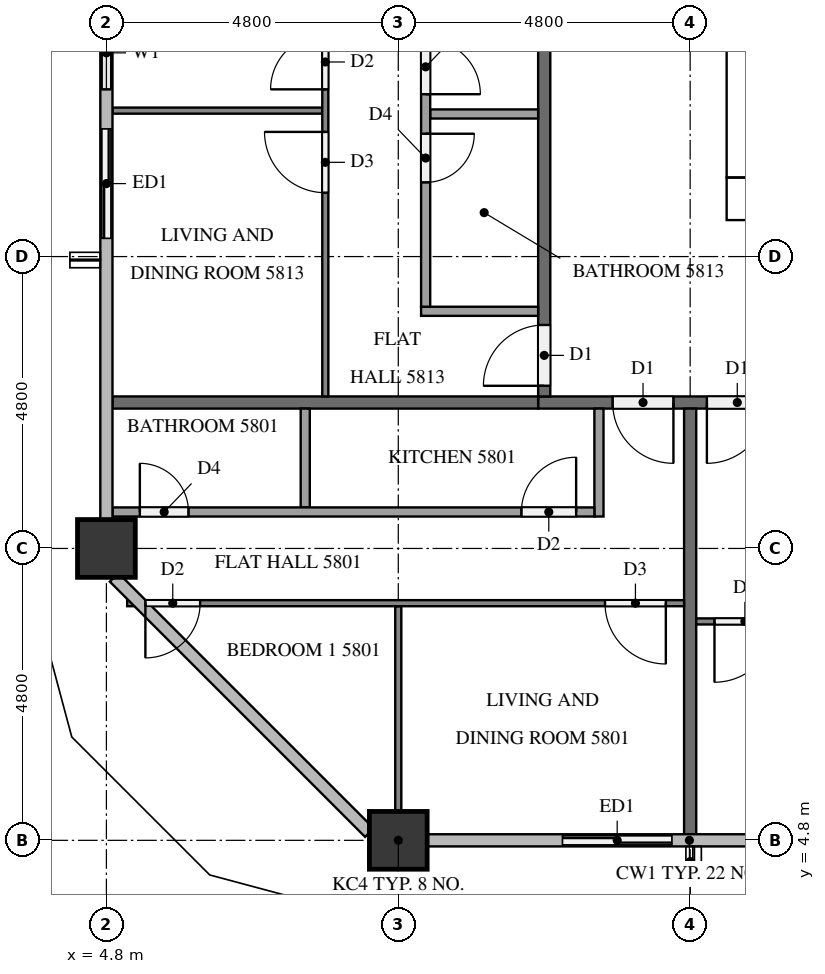
"""IFC4 building model, lengths in metres.
Left out: names, types, materials, properties, quantities, classifications, styles, units other than length and angle.
Written with IfcOpenShell. Run it as: python <this file> out.ifc"""

import sys

from ifc_helpers import new_model, si_unit, direction, frame, frame_2d, origin, origin_2d, place, context, subcontext, project, spatial, rectangle, extrude, element, fill, save


model = new_model("IFC4")
c1 = context("Model", 3, precision=1e-05, world=origin(), true_north=direction((0.0, 1.0)))
c2 = subcontext(c1, "Body", "Model", "MODEL_VIEW")
j1 = project(units=[si_unit("LENGTHUNIT", "METRE"), si_unit("PLANEANGLEUNIT", "RADIAN")], contexts=[c1])
p1 = place(None, origin())
s1 = spatial("IfcSite", under=j1, at=p1, CompositionType="ELEMENT")
p2 = place(p1, origin())
s2 = spatial("IfcBuilding", under=s1, at=p2, CompositionType="ELEMENT")
p3 = place(p2, frame((0.0, 0.0, 222.8)))
s3 = spatial("IfcBuildingStorey", under=s2, at=p3, CompositionType="ELEMENT", Elevation=222.8)
p4 = place(p3, frame((15.0, 15.35, 0.0), z_axis=(0.0, 0.0, 1.0), x_axis=(1.0, 0.0, 0.0)))
e1 = element("IfcWall", 1, at=p4, inside=s3, PredefinedType="SHEAR", context=c2, shape_type="SweptSolid", body=[
    extrude(rectangle(XDim=32.4, YDim=0.7, at=frame_2d((16.2, 0.0))), origin(), (0.0, 0.0, 1.0), 3.2),
])
p5 = place(p4, frame((15.3, 0.0, 0.0)))
e2 = element("IfcOpeningElement", 2, at=p5, cuts=e1, PredefinedType="OPENING", context=c2, shape_type="SweptSolid", body=[
    extrude(rectangle(XDim=1.8, YDim=2.1, at=frame_2d((0.9, 1.05))), frame((0.0, 0.36, 0.0), z_axis=(0.0, -1.0, 0.0), x_axis=(1.0, 0.0, 0.0)), (0.0, 0.0, 1.0), 0.72),
])
p6 = place(p3, frame((15.35, 15.7, 0.0), z_axis=(0.0, 0.0, 1.0), x_axis=(0.0, 1.0, 0.0)))
e3 = element("IfcWall", 3, at=p6, inside=s3, PredefinedType="SHEAR", context=c2, shape_type="SweptSolid", body=[
    extrude(rectangle(XDim=21.4, YDim=0.7, at=frame_2d((10.7, 0.0))), origin(), (0.0, 0.0, 1.0), 3.2),
])
p7 = place(p6, frame((5.06, 0.0, 0.0)))
e4 = element("IfcOpeningElement", 4, at=p7, cuts=e3, PredefinedType="OPENING", context=c2, shape_type="SweptSolid", body=[
    extrude(rectangle(XDim=1.2, YDim=2.1, at=frame_2d((0.6, 1.05))), frame((0.0, 0.36, 0.0), z_axis=(0.0, -1.0, 0.0), x_axis=(1.0, 0.0, 0.0)), (0.0, 0.0, 1.0), 0.72),
])
for number, where, z_axis, x_axis in (
    (5, (9.6, 4.8, 0.0), (0.0, 0.0, 1.0), (1.0, 0.0, 0.0)),
    (6, (4.8, 9.6, 0.0), (0.0, 0.0, 1.0), (1.0, 0.0, 0.0)),
):
    element("IfcColumn", number, at=place(p3, frame(where, z_axis=z_axis, x_axis=x_axis)), inside=s3, PredefinedType="COLUMN", context=c2, shape_type="SweptSolid", body=[
        extrude(rectangle(XDim=0.95, YDim=0.95, at=origin_2d()), origin(), (0.0, 0.0, 1.0), 3.2),
    ])
p8 = place(p3, frame((12.0, 4.8, 0.0), z_axis=(0.0, 0.0, 1.0), x_axis=(1.0, 0.0, 0.0)))
e7 = element("IfcWall", 7, at=p8, inside=s3, PredefinedType="SOLIDWALL", context=c2, shape_type="SweptSolid", body=[
    extrude(rectangle(XDim=2.4, YDim=0.15, at=frame_2d((1.2, 0.0))), origin(), (0.0, 0.0, 1.0), 3.2),
])
p9 = place(p8, frame((0.3, 0.0, 0.0)))
e8 = element("IfcOpeningElement", 8, at=p9, cuts=e7, PredefinedType="OPENING", context=c2, shape_type="SweptSolid", body=[
    extrude(rectangle(XDim=1.8, YDim=2.4, at=frame_2d((0.9, 1.2))), frame((0.0, 0.085, 0.0), z_axis=(0.0, -1.0, 0.0), x_axis=(1.0, 0.0, 0.0)), (0.0, 0.0, 1.0), 0.17),
])
p10 = place(p3, frame((4.8, 18.7, 0.0), z_axis=(0.0, 0.0, 1.0), x_axis=(0.0, -1.0, 0.0)))
e9 = element("IfcWall", 9, at=p10, inside=s3, PredefinedType="SOLIDWALL", context=c2, shape_type="SweptSolid", body=[
    extrude(rectangle(XDim=4.3, YDim=0.15, at=frame_2d((2.15, 0.0))), origin(), (0.0, 0.0, 1.0), 3.2),
])
p11 = place(p10, frame((0.35, 0.0, 0.9)))
e10 = element("IfcOpeningElement", 10, at=p11, cuts=e9, PredefinedType="OPENING", context=c2, shape_type="SweptSolid", body=[
    extrude(rectangle(XDim=1.2, YDim=1.4, at=frame_2d((0.6, 0.7))), frame((0.0, 0.085, 0.0), z_axis=(0.0, -1.0, 0.0), x_axis=(1.0, 0.0, 0.0)), (0.0, 0.0, 1.0), 0.17),
])
p12 = place(p10, frame((2.2, 0.0, 0.0)))
e11 = element("IfcOpeningElement", 11, at=p12, cuts=e9, PredefinedType="OPENING", context=c2, shape_type="SweptSolid", body=[
    extrude(rectangle(XDim=1.8, YDim=2.4, at=frame_2d((0.9, 1.2))), frame((0.0, 0.085, 0.0), z_axis=(0.0, -1.0, 0.0), x_axis=(1.0, 0.0, 0.0)), (0.0, 0.0, 1.0), 0.17),
])
p13 = place(p3, frame((50.5, 12.0, 0.0), z_axis=(0.0, 0.0, 1.0), x_axis=(-1.0, 0.0, 0.0)))
e12 = element("IfcWall", 12, at=p13, inside=s3, PredefinedType="PARTITIONING", context=c2, shape_type="SweptSolid", body=[
    extrude(rectangle(XDim=38.6, YDim=0.2, at=frame_2d((19.3, 0.0))), origin(), (0.0, 0.0, 1.0), 3.2),
])
p14 = place(p13, frame((36.375, 0.0, 0.0)))
e13 = element("IfcOpeningElement", 13, at=p14, cuts=e12, PredefinedType="OPENING", context=c2, shape_type="SweptSolid", body=[
    extrude(rectangle(XDim=1.0, YDim=2.1, at=frame_2d((0.5, 1.05))), frame((0.0, 0.11, 0.0), z_axis=(0.0, -1.0, 0.0), x_axis=(1.0, 0.0, 0.0)), (0.0, 0.0, 1.0), 0.22),
])
p15 = place(p13, frame((34.825, 0.0, 0.0)))
e14 = element("IfcOpeningElement", 14, at=p15, cuts=e12, PredefinedType="OPENING", context=c2, shape_type="SweptSolid", body=[
    extrude(rectangle(XDim=1.0, YDim=2.1, at=frame_2d((0.5, 1.05))), frame((0.0, 0.11, 0.0), z_axis=(0.0, -1.0, 0.0), x_axis=(1.0, 0.0, 0.0)), (0.0, 0.0, 1.0), 0.22),
])
p16 = place(p13, frame((20.375, 0.0, 0.0)))
e15 = element("IfcOpeningElement", 15, at=p16, cuts=e12, PredefinedType="OPENING", context=c2, shape_type="SweptSolid", body=[
    extrude(rectangle(XDim=1.1, YDim=2.1, at=frame_2d((0.55, 1.05))), frame((0.0, 0.11, 0.0), z_axis=(0.0, -1.0, 0.0), x_axis=(1.0, 0.0, 0.0)), (0.0, 0.0, 1.0), 0.22),
])
p17 = place(p13, frame((1.225, 0.0, 0.0)))
e16 = element("IfcOpeningElement", 16, at=p17, cuts=e12, PredefinedType="OPENING", context=c2, shape_type="SweptSolid", body=[
    extrude(rectangle(XDim=1.0, YDim=2.1, at=frame_2d((0.5, 1.05))), frame((0.0, 0.11, 0.0), z_axis=(0.0, -1.0, 0.0), x_axis=(1.0, 0.0, 0.0)), (0.0, 0.0, 1.0), 0.22),
])
p18 = place(p3, frame((12.0, 12.1, 0.0), z_axis=(0.0, 0.0, 1.0), x_axis=(0.0, 1.0, 0.0)))
e17 = element("IfcWall", 17, at=p18, inside=s3, PredefinedType="PARTITIONING", context=c2, shape_type="SweptSolid", body=[
    extrude(rectangle(XDim=28.6, YDim=0.2, at=frame_2d((14.3, 0.0))), origin(), (0.0, 0.0, 1.0), 3.2),
])
p19 = place(p18, frame((9.725, 0.0, 0.0)))
e18 = element("IfcOpeningElement", 18, at=p19, cuts=e17, PredefinedType="OPENING", context=c2, shape_type="SweptSolid", body=[
    extrude(rectangle(XDim=1.1, YDim=2.1, at=frame_2d((0.55, 1.05))), frame((0.0, 0.11, 0.0), z_axis=(0.0, -1.0, 0.0), x_axis=(1.0, 0.0, 0.0)), (0.0, 0.0, 1.0), 0.22),
])
p20 = place(p18, frame((0.175, 0.0, 0.0)))
e19 = element("IfcOpeningElement", 19, at=p20, cuts=e17, PredefinedType="OPENING", context=c2, shape_type="SweptSolid", body=[
    extrude(rectangle(XDim=1.0, YDim=2.1, at=frame_2d((0.5, 1.05))), frame((0.0, 0.11, 0.0), z_axis=(0.0, -1.0, 0.0), x_axis=(1.0, 0.0, 0.0)), (0.0, 0.0, 1.0), 0.22),
])
for number, where, z_axis, x_axis in (
    (20, (14.4, 11.9, 0.0), (0.0, 0.0, 1.0), (0.0, -1.0, 0.0)),
    (21, (4.9, 12.0, 0.0), (0.0, 0.0, 1.0), (1.0, 0.0, 0.0)),
):
    element("IfcWall", number, at=place(p3, frame(where, z_axis=z_axis, x_axis=x_axis)), inside=s3, PredefinedType="PARTITIONING", context=c2, shape_type="SweptSolid", body=[
        extrude(rectangle(XDim=7.0, YDim=0.2, at=frame_2d((3.5, 0.0))), origin(), (0.0, 0.0, 1.0), 3.2),
    ])
p21 = place(p3, frame((9.6, 8.65, 0.0), z_axis=(0.0, 0.0, 1.0), x_axis=(0.0, -1.0, 0.0)))
e22 = element("IfcWall", 22, at=p21, inside=s3, PredefinedType="PARTITIONING", context=c2, shape_type="SweptSolid", body=[
    extrude(rectangle(XDim=3.375, YDim=0.1, at=frame_2d((1.688, 0.0))), origin(), (0.0, 0.0, 1.0), 3.2),
])
p22 = place(p3, frame((14.3, 8.7, 0.0), z_axis=(0.0, 0.0, 1.0), x_axis=(-1.0, 0.0, 0.0)))
e23 = element("IfcWall", 23, at=p22, inside=s3, PredefinedType="PARTITIONING", context=c2, shape_type="SweptSolid", body=[
    extrude(rectangle(XDim=9.159, YDim=0.1, at=frame_2d((4.58, 0.0))), origin(), (0.0, 0.0, 1.0), 3.2),
])
p23 = place(p22, frame((0.3, 0.0, 0.0)))
e24 = element("IfcOpeningElement", 24, at=p23, cuts=e23, PredefinedType="OPENING", context=c2, shape_type="SweptSolid", body=[
    extrude(rectangle(XDim=1.0, YDim=2.1, at=frame_2d((0.5, 1.05))), frame((0.0, 0.06, 0.0), z_axis=(0.0, -1.0, 0.0), x_axis=(1.0, 0.0, 0.0)), (0.0, 0.0, 1.0), 0.12),
])
p24 = place(p22, frame((7.959, 0.0, 0.0)))
e25 = element("IfcOpeningElement", 25, at=p24, cuts=e23, PredefinedType="OPENING", context=c2, shape_type="SweptSolid", body=[
    extrude(rectangle(XDim=0.9, YDim=2.1, at=frame_2d((0.45, 1.05))), frame((0.0, 0.06, 0.0), z_axis=(0.0, -1.0, 0.0), x_axis=(1.0, 0.0, 0.0)), (0.0, 0.0, 1.0), 0.12),
])
p25 = place(p3, frame((8.07, 11.9, 0.0), z_axis=(0.0, 0.0, 1.0), x_axis=(0.0, -1.0, 0.0)))
e26 = element("IfcWall", 26, at=p25, inside=s3, PredefinedType="PARTITIONING", context=c2, shape_type="SweptSolid", body=[
    extrude(rectangle(XDim=1.625, YDim=0.15, at=frame_2d((0.812, 0.0))), origin(), (0.0, 0.0, 1.0), 3.2),
])
p26 = place(p3, frame((12.9, 11.9, 0.0), z_axis=(0.0, 0.0, 1.0), x_axis=(0.0, -1.0, 0.0)))
e27 = element("IfcWall", 27, at=p26, inside=s3, PredefinedType="PARTITIONING", context=c2, shape_type="SweptSolid", body=[
    extrude(rectangle(XDim=1.775, YDim=0.15, at=frame_2d((0.887, 0.0))), origin(), (0.0, 0.0, 1.0), 3.2),
])
p27 = place(p3, frame((4.9, 10.2, 0.0), z_axis=(0.0, 0.0, 1.0), x_axis=(1.0, 0.0, 0.0)))
e28 = element("IfcWall", 28, at=p27, inside=s3, PredefinedType="PARTITIONING", context=c2, shape_type="SweptSolid", body=[
    extrude(rectangle(XDim=7.925, YDim=0.15, at=frame_2d((3.962, 0.0))), origin(), (0.0, 0.0, 1.0), 3.2),
])
p28 = place(p27, frame((6.725, 0.0, 0.0)))
e29 = element("IfcOpeningElement", 29, at=p28, cuts=e28, PredefinedType="OPENING", context=c2, shape_type="SweptSolid", body=[
    extrude(rectangle(XDim=0.9, YDim=2.1, at=frame_2d((0.45, 1.05))), frame((0.0, 0.085, 0.0), z_axis=(0.0, -1.0, 0.0), x_axis=(1.0, 0.0, 0.0)), (0.0, 0.0, 1.0), 0.17),
])
p29 = place(p27, frame((0.45, 0.0, 0.0)))
e30 = element("IfcOpeningElement", 30, at=p29, cuts=e28, PredefinedType="OPENING", context=c2, shape_type="SweptSolid", body=[
    extrude(rectangle(XDim=0.8, YDim=2.1, at=frame_2d((0.4, 1.05))), frame((0.0, 0.085, 0.0), z_axis=(0.0, -1.0, 0.0), x_axis=(1.0, 0.0, 0.0)), (0.0, 0.0, 1.0), 0.17),
])
p30 = place(p3, frame((28.7, 8.4, 0.0), z_axis=(0.0, 0.0, 1.0), x_axis=(-1.0, 0.0, 0.0)))
e31 = element("IfcWall", 31, at=p30, inside=s3, PredefinedType="PARTITIONING", context=c2, shape_type="SweptSolid", body=[
    extrude(rectangle(XDim=14.2, YDim=0.1, at=frame_2d((7.1, 0.0))), origin(), (0.0, 0.0, 1.0), 3.2),
])
p31 = place(p30, frame((12.9, 0.0, 0.0)))
e32 = element("IfcOpeningElement", 32, at=p31, cuts=e31, PredefinedType="OPENING", context=c2, shape_type="SweptSolid", body=[
    extrude(rectangle(XDim=1.0, YDim=2.1, at=frame_2d((0.5, 1.05))), frame((0.0, 0.06, 0.0), z_axis=(0.0, -1.0, 0.0), x_axis=(1.0, 0.0, 0.0)), (0.0, 0.0, 1.0), 0.12),
])
p32 = place(p30, frame((5.05, 0.0, 0.0)))
e33 = element("IfcOpeningElement", 33, at=p32, cuts=e31, PredefinedType="OPENING", context=c2, shape_type="SweptSolid", body=[
    extrude(rectangle(XDim=0.9, YDim=2.1, at=frame_2d((0.45, 1.05))), frame((0.0, 0.06, 0.0), z_axis=(0.0, -1.0, 0.0), x_axis=(1.0, 0.0, 0.0)), (0.0, 0.0, 1.0), 0.12),
])
p33 = place(p30, frame((3.45, 0.0, 0.0)))
e34 = element("IfcOpeningElement", 34, at=p33, cuts=e31, PredefinedType="OPENING", context=c2, shape_type="SweptSolid", body=[
    extrude(rectangle(XDim=0.9, YDim=2.1, at=frame_2d((0.45, 1.05))), frame((0.0, 0.06, 0.0), z_axis=(0.0, -1.0, 0.0), x_axis=(1.0, 0.0, 0.0)), (0.0, 0.0, 1.0), 0.12),
])
p34 = place(p3, frame((8.35, 16.8, 0.0), z_axis=(0.0, 0.0, 1.0), x_axis=(-1.0, 0.0, 0.0)))
e35 = element("IfcWall", 35, at=p34, inside=s3, PredefinedType="PARTITIONING", context=c2, shape_type="SweptSolid", body=[
    extrude(rectangle(XDim=3.45, YDim=0.1, at=frame_2d((1.725, 0.0))), origin(), (0.0, 0.0, 1.0), 3.2),
])
p35 = place(p3, frame((8.4, 12.1, 0.0), z_axis=(0.0, 0.0, 1.0), x_axis=(0.0, 1.0, 0.0)))
e36 = element("IfcWall", 36, at=p35, inside=s3, PredefinedType="PARTITIONING", context=c2, shape_type="SweptSolid", body=[
    extrude(rectangle(XDim=9.4, YDim=0.1, at=frame_2d((4.7, 0.0))), origin(), (0.0, 0.0, 1.0), 3.2),
])
p36 = place(p35, frame((3.35, 0.0, 0.0)))
e37 = element("IfcOpeningElement", 37, at=p36, cuts=e36, PredefinedType="OPENING", context=c2, shape_type="SweptSolid", body=[
    extrude(rectangle(XDim=1.0, YDim=2.1, at=frame_2d((0.5, 1.05))), frame((0.0, 0.06, 0.0), z_axis=(0.0, -1.0, 0.0), x_axis=(1.0, 0.0, 0.0)), (0.0, 0.0, 1.0), 0.12),
])
p37 = place(p35, frame((5.05, 0.0, 0.0)))
e38 = element("IfcOpeningElement", 38, at=p37, cuts=e36, PredefinedType="OPENING", context=c2, shape_type="SweptSolid", body=[
    extrude(rectangle(XDim=0.9, YDim=2.1, at=frame_2d((0.45, 1.05))), frame((0.0, 0.06, 0.0), z_axis=(0.0, -1.0, 0.0), x_axis=(1.0, 0.0, 0.0)), (0.0, 0.0, 1.0), 0.12),
])
p38 = place(p3, frame((11.9, 16.745, 0.0), z_axis=(0.0, 0.0, 1.0), x_axis=(-1.0, 0.0, 0.0)))
e39 = element("IfcWall", 39, at=p38, inside=s3, PredefinedType="PARTITIONING", context=c2, shape_type="SweptSolid", body=[
    extrude(rectangle(XDim=1.775, YDim=0.15, at=frame_2d((0.887, 0.0))), origin(), (0.0, 0.0, 1.0), 3.2),
])
p39 = place(p3, frame((11.9, 13.5, 0.0), z_axis=(0.0, 0.0, 1.0), x_axis=(-1.0, 0.0, 0.0)))
e40 = element("IfcWall", 40, at=p39, inside=s3, PredefinedType="PARTITIONING", context=c2, shape_type="SweptSolid", body=[
    extrude(rectangle(XDim=1.925, YDim=0.15, at=frame_2d((0.962, 0.0))), origin(), (0.0, 0.0, 1.0), 3.2),
])
p40 = place(p3, frame((10.05, 21.5, 0.0), z_axis=(0.0, 0.0, 1.0), x_axis=(0.0, -1.0, 0.0)))
e41 = element("IfcWall", 41, at=p40, inside=s3, PredefinedType="PARTITIONING", context=c2, shape_type="SweptSolid", body=[
    extrude(rectangle(XDim=7.925, YDim=0.15, at=frame_2d((3.962, 0.0))), origin(), (0.0, 0.0, 1.0), 3.2),
])
p41 = place(p40, frame((5.08, 0.0, 0.0)))
e42 = element("IfcOpeningElement", 42, at=p41, cuts=e41, PredefinedType="OPENING", context=c2, shape_type="SweptSolid", body=[
    extrude(rectangle(XDim=0.8, YDim=2.1, at=frame_2d((0.4, 1.05))), frame((0.0, 0.085, 0.0), z_axis=(0.0, -1.0, 0.0), x_axis=(1.0, 0.0, 0.0)), (0.0, 0.0, 1.0), 0.17),
])
p42 = place(p40, frame((3.53, 0.0, 0.0)))
e43 = element("IfcOpeningElement", 43, at=p42, cuts=e41, PredefinedType="OPENING", context=c2, shape_type="SweptSolid", body=[
    extrude(rectangle(XDim=0.9, YDim=2.1, at=frame_2d((0.45, 1.05))), frame((0.0, 0.085, 0.0), z_axis=(0.0, -1.0, 0.0), x_axis=(1.0, 0.0, 0.0)), (0.0, 0.0, 1.0), 0.17),
])
p43 = place(p9, origin())
e44 = element("IfcDoor", 44, at=p43, inside=s3, OperationType="SLIDING_TO_LEFT", PredefinedType="DOOR", context=c2, shape_type="SweptSolid", body=[
    extrude(rectangle(XDim=1.8, YDim=2.4, at=frame_2d((0.9, 1.2))), frame((0.0, 0.025, 0.0), z_axis=(0.0, -1.0, 0.0), x_axis=(1.0, 0.0, 0.0)), (0.0, 0.0, 1.0), 0.05),
])
fill(e8, e44)
p44 = place(p11, origin())
e45 = element("IfcWindow", 45, at=p44, inside=s3, PartitioningType="SINGLE_PANEL", PredefinedType="WINDOW", context=c2, shape_type="SweptSolid", body=[
    extrude(rectangle(XDim=1.2, YDim=1.4, at=frame_2d((0.6, 0.7))), frame((0.0, 0.03, 0.0), z_axis=(0.0, -1.0, 0.0), x_axis=(1.0, 0.0, 0.0)), (0.0, 0.0, 1.0), 0.06),
])
fill(e10, e45)
p45 = place(p12, origin())
e46 = element("IfcDoor", 46, at=p45, inside=s3, OperationType="SLIDING_TO_LEFT", PredefinedType="DOOR", context=c2, shape_type="SweptSolid", body=[
    extrude(rectangle(XDim=1.8, YDim=2.4, at=frame_2d((0.9, 1.2))), frame((0.0, 0.025, 0.0), z_axis=(0.0, -1.0, 0.0), x_axis=(1.0, 0.0, 0.0)), (0.0, 0.0, 1.0), 0.05),
])
fill(e11, e46)
p46 = place(p14, origin())
e47 = element("IfcDoor", 47, at=p46, inside=s3, OperationType="SINGLE_SWING_LEFT", PredefinedType="DOOR", context=c2, shape_type="SweptSolid", body=[
    extrude(rectangle(XDim=1.0, YDim=2.1, at=frame_2d((0.5, 1.05))), frame((0.0, 0.025, 0.0), z_axis=(0.0, -1.0, 0.0), x_axis=(1.0, 0.0, 0.0)), (0.0, 0.0, 1.0), 0.05),
])
fill(e13, e47)
p47 = place(p15, origin())
e48 = element("IfcDoor", 48, at=p47, inside=s3, OperationType="SINGLE_SWING_RIGHT", PredefinedType="DOOR", context=c2, shape_type="SweptSolid", body=[
    extrude(rectangle(XDim=1.0, YDim=2.1, at=frame_2d((0.5, 1.05))), frame((0.0, 0.025, 0.0), z_axis=(0.0, -1.0, 0.0), x_axis=(1.0, 0.0, 0.0)), (0.0, 0.0, 1.0), 0.05),
])
fill(e14, e48)
p48 = place(p20, origin())
e49 = element("IfcDoor", 49, at=p48, inside=s3, OperationType="SINGLE_SWING_LEFT", PredefinedType="DOOR", context=c2, shape_type="SweptSolid", body=[
    extrude(rectangle(XDim=1.0, YDim=2.1, at=frame_2d((0.5, 1.05))), frame((0.0, 0.025, 0.0), z_axis=(0.0, -1.0, 0.0), x_axis=(1.0, 0.0, 0.0)), (0.0, 0.0, 1.0), 0.05),
])
fill(e19, e49)
p49 = place(p23, origin())
e50 = element("IfcDoor", 50, at=p49, inside=s3, OperationType="SINGLE_SWING_LEFT", PredefinedType="DOOR", context=c2, shape_type="SweptSolid", body=[
    extrude(rectangle(XDim=1.0, YDim=2.1, at=frame_2d((0.5, 1.05))), frame((0.0, 0.025, 0.0), z_axis=(0.0, -1.0, 0.0), x_axis=(1.0, 0.0, 0.0)), (0.0, 0.0, 1.0), 0.05),
])
fill(e24, e50)
p50 = place(p24, origin())
e51 = element("IfcDoor", 51, at=p50, inside=s3, OperationType="SINGLE_SWING_RIGHT", PredefinedType="DOOR", context=c2, shape_type="SweptSolid", body=[
    extrude(rectangle(XDim=0.9, YDim=2.1, at=frame_2d((0.45, 1.05))), frame((0.0, 0.025, 0.0), z_axis=(0.0, -1.0, 0.0), x_axis=(1.0, 0.0, 0.0)), (0.0, 0.0, 1.0), 0.05),
])
fill(e25, e51)
p51 = place(p28, origin())
e52 = element("IfcDoor", 52, at=p51, inside=s3, OperationType="SINGLE_SWING_RIGHT", PredefinedType="DOOR", context=c2, shape_type="SweptSolid", body=[
    extrude(rectangle(XDim=0.9, YDim=2.1, at=frame_2d((0.45, 1.05))), frame((0.0, 0.025, 0.0), z_axis=(0.0, -1.0, 0.0), x_axis=(1.0, 0.0, 0.0)), (0.0, 0.0, 1.0), 0.05),
])
fill(e29, e52)
p52 = place(p29, origin())
e53 = element("IfcDoor", 53, at=p52, inside=s3, OperationType="SINGLE_SWING_LEFT", PredefinedType="DOOR", context=c2, shape_type="SweptSolid", body=[
    extrude(rectangle(XDim=0.8, YDim=2.1, at=frame_2d((0.4, 1.05))), frame((0.0, 0.025, 0.0), z_axis=(0.0, -1.0, 0.0), x_axis=(1.0, 0.0, 0.0)), (0.0, 0.0, 1.0), 0.05),
])
fill(e30, e53)
p53 = place(p31, origin())
e54 = element("IfcDoor", 54, at=p53, inside=s3, OperationType="SINGLE_SWING_RIGHT", PredefinedType="DOOR", context=c2, shape_type="SweptSolid", body=[
    extrude(rectangle(XDim=1.0, YDim=2.1, at=frame_2d((0.5, 1.05))), frame((0.0, 0.025, 0.0), z_axis=(0.0, -1.0, 0.0), x_axis=(1.0, 0.0, 0.0)), (0.0, 0.0, 1.0), 0.05),
])
fill(e32, e54)
p54 = place(p36, origin())
e55 = element("IfcDoor", 55, at=p54, inside=s3, OperationType="SINGLE_SWING_RIGHT", PredefinedType="DOOR", context=c2, shape_type="SweptSolid", body=[
    extrude(rectangle(XDim=1.0, YDim=2.1, at=frame_2d((0.5, 1.05))), frame((0.0, 0.025, 0.0), z_axis=(0.0, -1.0, 0.0), x_axis=(1.0, 0.0, 0.0)), (0.0, 0.0, 1.0), 0.05),
])
fill(e37, e55)
p55 = place(p37, origin())
e56 = element("IfcDoor", 56, at=p55, inside=s3, OperationType="SINGLE_SWING_LEFT", PredefinedType="DOOR", context=c2, shape_type="SweptSolid", body=[
    extrude(rectangle(XDim=0.9, YDim=2.1, at=frame_2d((0.45, 1.05))), frame((0.0, 0.025, 0.0), z_axis=(0.0, -1.0, 0.0), x_axis=(1.0, 0.0, 0.0)), (0.0, 0.0, 1.0), 0.05),
])
fill(e38, e56)
p56 = place(p41, origin())
e57 = element("IfcDoor", 57, at=p56, inside=s3, OperationType="SINGLE_SWING_LEFT", PredefinedType="DOOR", context=c2, shape_type="SweptSolid", body=[
    extrude(rectangle(XDim=0.8, YDim=2.1, at=frame_2d((0.4, 1.05))), frame((0.0, 0.025, 0.0), z_axis=(0.0, -1.0, 0.0), x_axis=(1.0, 0.0, 0.0)), (0.0, 0.0, 1.0), 0.05),
])
fill(e42, e57)
p57 = place(p42, origin())
e58 = element("IfcDoor", 58, at=p57, inside=s3, OperationType="SINGLE_SWING_RIGHT", PredefinedType="DOOR", context=c2, shape_type="SweptSolid", body=[
    extrude(rectangle(XDim=0.9, YDim=2.1, at=frame_2d((0.45, 1.05))), frame((0.0, 0.025, 0.0), z_axis=(0.0, -1.0, 0.0), x_axis=(1.0, 0.0, 0.0)), (0.0, 0.0, 1.0), 0.05),
])
fill(e43, e58)
save(model, sys.argv[1])
